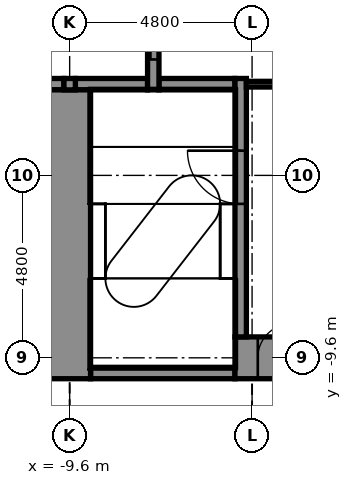
"""IFC4 building model, lengths in metres.
Left out: names, types, materials, properties, quantities, classifications, styles, units other than length and angle.
Written with IfcOpenShell. Run it as: python <this file> out.ifc"""

import sys

from ifc_helpers import new_model, si_unit, direction, frame, frame_2d, origin, place, context, subcontext, project, spatial, rectangle, extrude, element, fill, save


model = new_model("IFC4")
c1 = context("Model", 3, precision=1e-05, world=origin(), true_north=direction((0.0, 1.0)))
c2 = subcontext(c1, "Body", "Model", "MODEL_VIEW")
j1 = project(units=[si_unit("LENGTHUNIT", "METRE"), si_unit("PLANEANGLEUNIT", "RADIAN")], contexts=[c1])
p1 = place(None, origin())
s1 = spatial("IfcSite", under=j1, at=p1, CompositionType="ELEMENT")
p2 = place(p1, origin())
s2 = spatial("IfcBuilding", under=s1, at=p2, CompositionType="ELEMENT")
p3 = place(p2, frame((0.0, 0.0, 17.4)))
s3 = spatial("IfcBuildingStorey", under=s2, at=p3, CompositionType="ELEMENT", Elevation=17.4)
p4 = place(p3, frame((-9.05, -10.0, -0.25), z_axis=(0.0, 0.0, 1.0), x_axis=(1.0, 0.0, 0.0)))
e1 = element("IfcWall", 1, at=p4, inside=s3, PredefinedType="STANDARD", context=c2, shape_type="SweptSolid", body=[
    extrude(rectangle(XDim=3.8, YDim=0.3, at=frame_2d((1.9, 0.0))), origin(), (0.0, 0.0, 1.0), 5.0),
])
p5 = place(p3, frame((-5.25, -9.6, -0.25), z_axis=(0.0, 0.0, 1.0), x_axis=(1.0, 0.0, 0.0)))
e2 = element("IfcWall", 2, at=p5, inside=s3, PredefinedType="SHEAR", context=c2, shape_type="SweptSolid", body=[
    extrude(rectangle(XDim=10.2, YDim=1.1, at=frame_2d((5.1, 0.0))), origin(), (0.0, 0.0, 1.0), 5.0),
])
p6 = place(p5, frame((0.6, 0.0, 0.25)))
e3 = element("IfcOpeningElement", 3, at=p6, cuts=e2, PredefinedType="OPENING", context=c2, shape_type="SweptSolid", body=[
    extrude(rectangle(XDim=0.9, YDim=2.1, at=frame_2d((0.45, 1.05))), frame((0.0, 0.56, 0.0), z_axis=(0.0, -1.0, 0.0), x_axis=(1.0, 0.0, 0.0)), (0.0, 0.0, 1.0), 1.12),
])
p7 = place(p3, frame((-10.85, -2.4, -0.25), z_axis=(0.0, 0.0, 1.0), x_axis=(1.0, 0.0, 0.0)))
e4 = element("IfcWall", 4, at=p7, inside=s3, PredefinedType="STANDARD", context=c2, shape_type="SweptSolid", body=[
    extrude(rectangle(XDim=1.1, YDim=0.3, at=frame_2d((0.55, 0.0))), origin(), (0.0, 0.0, 1.0), 5.0),
])
p8 = place(p3, frame((-9.45, -2.4, -0.25), z_axis=(0.0, 0.0, 1.0), x_axis=(1.0, 0.0, 0.0)))
e5 = element("IfcWall", 5, at=p8, inside=s3, PredefinedType="STANDARD", context=c2, shape_type="SweptSolid", body=[
    extrude(rectangle(XDim=1.9, YDim=0.3, at=frame_2d((0.95, 0.0))), origin(), (0.0, 0.0, 1.0), 5.0),
])
p9 = place(p3, frame((-7.25, -2.4, -0.25), z_axis=(0.0, 0.0, 1.0), x_axis=(1.0, 0.0, 0.0)))
e6 = element("IfcWall", 6, at=p9, inside=s3, PredefinedType="STANDARD", context=c2, shape_type="SweptSolid", body=[
    extrude(rectangle(XDim=2.0, YDim=0.3, at=frame_2d((1.0, 0.0))), origin(), (0.0, 0.0, 1.0), 5.0),
])
p10 = place(p3, frame((-9.6, -10.15, -0.25), z_axis=(0.0, 0.0, 1.0), x_axis=(0.0, 1.0, 0.0)))
e7 = element("IfcWall", 7, at=p10, inside=s3, PredefinedType="SHEAR", context=c2, shape_type="SweptSolid", body=[
    extrude(rectangle(XDim=7.6, YDim=1.1, at=frame_2d((3.8, 0.0))), origin(), (0.0, 0.0, 1.0), 5.0),
])
p11 = place(p3, frame((-9.6, -2.55, -0.25), z_axis=(0.0, 0.0, 1.0), x_axis=(0.0, 1.0, 0.0)))
e8 = element("IfcWall", 8, at=p11, inside=s3, PredefinedType="STANDARD", context=c2, shape_type="SweptSolid", body=[
    extrude(rectangle(XDim=0.3, YDim=0.3, at=frame_2d((0.15, 0.0))), origin(), (0.0, 0.0, 1.0), 5.0),
])
p12 = place(p3, frame((-7.4, -2.55, -0.25), z_axis=(0.0, 0.0, 1.0), x_axis=(0.0, 1.0, 0.0)))
e9 = element("IfcWall", 9, at=p12, inside=s3, PredefinedType="STANDARD", context=c2, shape_type="SweptSolid", body=[
    extrude(rectangle(XDim=5.1, YDim=0.3, at=frame_2d((2.55, 0.0))), origin(), (0.0, 0.0, 1.0), 5.0),
])
p13 = place(p12, frame((0.8, 0.0, 0.25)))
e10 = element("IfcOpeningElement", 10, at=p13, cuts=e9, PredefinedType="OPENING", context=c2, shape_type="SweptSolid", body=[
    extrude(rectangle(XDim=1.1, YDim=2.1, at=frame_2d((0.55, 1.05))), frame((0.0, 0.16, 0.0), z_axis=(0.0, -1.0, 0.0), x_axis=(1.0, 0.0, 0.0)), (0.0, 0.0, 1.0), 0.32),
])
p14 = place(p12, frame((3.2, 0.0, 0.25)))
e11 = element("IfcOpeningElement", 11, at=p14, cuts=e9, PredefinedType="OPENING", context=c2, shape_type="SweptSolid", body=[
    extrude(rectangle(XDim=1.1, YDim=2.1, at=frame_2d((0.55, 1.05))), frame((0.0, 0.16, 0.0), z_axis=(0.0, -1.0, 0.0), x_axis=(1.0, 0.0, 0.0)), (0.0, 0.0, 1.0), 0.32),
])
p15 = place(p3, frame((-5.1, -9.05, -0.25), z_axis=(0.0, 0.0, 1.0), x_axis=(0.0, 1.0, 0.0)))
e12 = element("IfcWall", 12, at=p15, inside=s3, PredefinedType="STANDARD", context=c2, shape_type="SweptSolid", body=[
    extrude(rectangle(XDim=6.8, YDim=0.3, at=frame_2d((3.4, 0.0))), origin(), (0.0, 0.0, 1.0), 5.0),
])
p16 = place(p15, frame((3.5, 0.0, 0.25)))
e13 = element("IfcOpeningElement", 13, at=p16, cuts=e12, PredefinedType="OPENING", context=c2, shape_type="SweptSolid", body=[
    extrude(rectangle(XDim=1.4, YDim=2.1, at=frame_2d((0.7, 1.05))), frame((0.0, 0.16, 0.0), z_axis=(0.0, -1.0, 0.0), x_axis=(1.0, 0.0, 0.0)), (0.0, 0.0, 1.0), 0.32),
])
p17 = place(p3, frame((-4.95, -2.4, 0.0), z_axis=(0.0, 0.0, 1.0), x_axis=(1.0, 0.0, 0.0)))
e14 = element("IfcWall", 14, at=p17, inside=s3, PredefinedType="PARTITIONING", context=c2, shape_type="SweptSolid", body=[
    extrude(rectangle(XDim=1.2, YDim=0.15, at=frame_2d((0.6, 0.0))), origin(), (0.0, 0.0, 1.0), 4.75),
])
p18 = place(p13, origin())
e15 = element("IfcDoor", 15, at=p18, inside=s3, OperationType="DOUBLE_DOOR_SLIDING", PredefinedType="DOOR", context=c2, shape_type="SweptSolid", body=[
    extrude(rectangle(XDim=1.1, YDim=2.1, at=frame_2d((0.55, 1.05))), frame((0.0, 0.025, 0.0), z_axis=(0.0, -1.0, 0.0), x_axis=(1.0, 0.0, 0.0)), (0.0, 0.0, 1.0), 0.05),
])
fill(e10, e15)
p19 = place(p16, origin())
e16 = element("IfcDoor", 16, at=p19, inside=s3, OperationType="SINGLE_SWING_RIGHT", PredefinedType="DOOR", context=c2, shape_type="SweptSolid", body=[
    extrude(rectangle(XDim=1.4, YDim=2.1, at=frame_2d((0.7, 1.05))), frame((0.0, 0.025, 0.0), z_axis=(0.0, -1.0, 0.0), x_axis=(1.0, 0.0, 0.0)), (0.0, 0.0, 1.0), 0.05),
])
fill(e13, e16)
p20 = place(p6, origin())
e17 = element("IfcDoor", 17, at=p20, inside=s3, OperationType="SINGLE_SWING_RIGHT", PredefinedType="DOOR", context=c2, shape_type="SweptSolid", body=[
    extrude(rectangle(XDim=0.9, YDim=2.1, at=frame_2d((0.45, 1.05))), frame((0.0, 0.025, 0.0), z_axis=(0.0, -1.0, 0.0), x_axis=(1.0, 0.0, 0.0)), (0.0, 0.0, 1.0), 0.05),
])
fill(e3, e17)
save(model, sys.argv[1])
